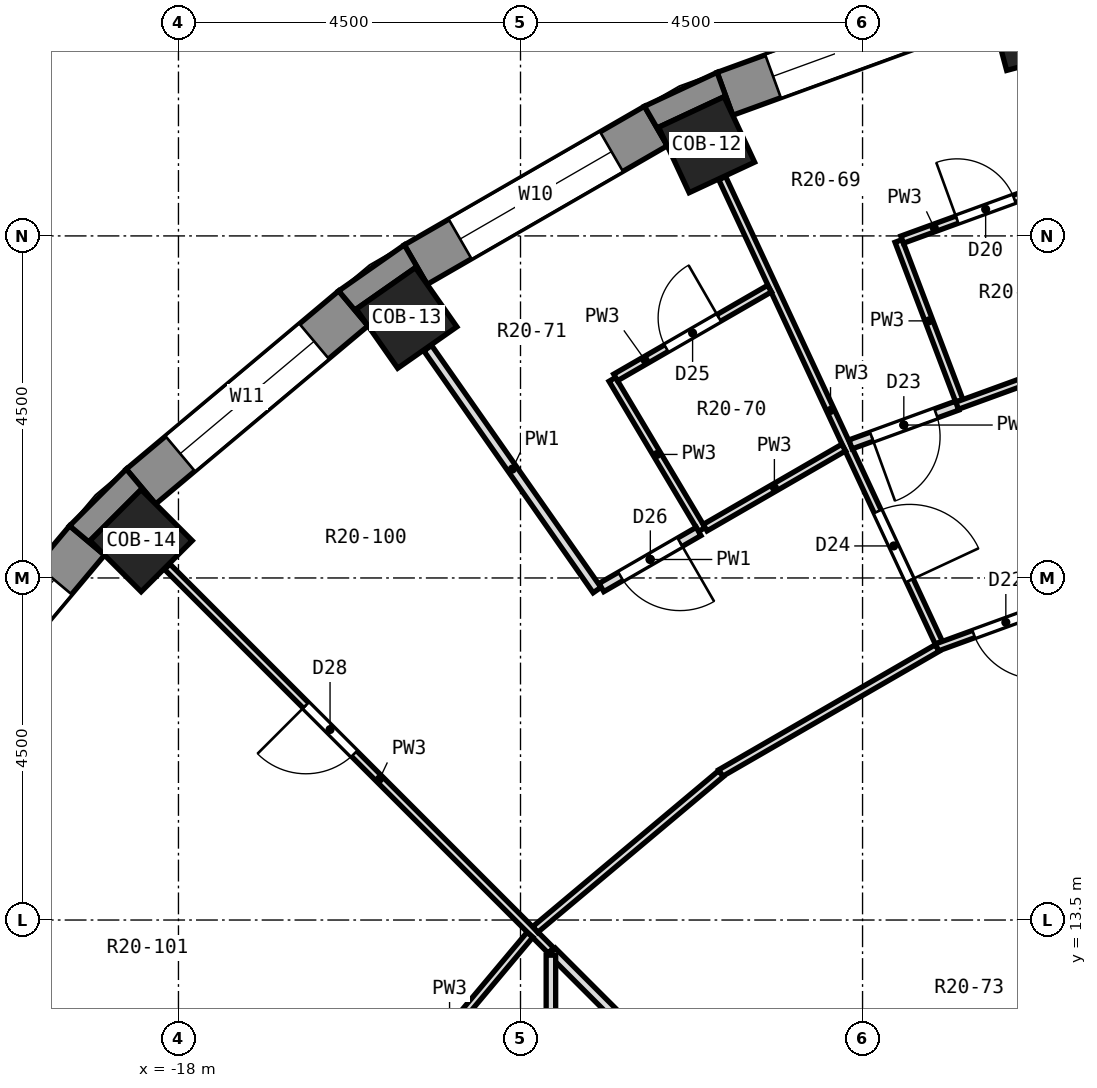
"""IFC4 building model, lengths in metres.
Left out: names, types, materials, properties, quantities, classifications, styles, units other than length and angle.
Written with IfcOpenShell. Run it as: python <this file> out.ifc"""

import sys

from ifc_helpers import new_model, si_unit, direction, frame, frame_2d, origin, origin_2d, place, context, subcontext, project, spatial, polyline, rectangle, outline, extrude, element, fill, save


model = new_model("IFC4")
c1 = context("Model", 3, precision=1e-05, world=origin(), true_north=direction((0.0, 1.0)))
c2 = subcontext(c1, "Body", "Model", "MODEL_VIEW")
j1 = project(units=[si_unit("LENGTHUNIT", "METRE"), si_unit("PLANEANGLEUNIT", "RADIAN")], contexts=[c1])
p1 = place(None, origin())
s1 = spatial("IfcSite", under=j1, at=p1, CompositionType="ELEMENT")
p2 = place(p1, origin())
s2 = spatial("IfcBuilding", under=s1, at=p2, CompositionType="ELEMENT")
p3 = place(p2, frame((0.0, 0.0, 121.6)))
s3 = spatial("IfcBuildingStorey", under=s2, at=p3, CompositionType="ELEMENT", Elevation=121.6)
for number, where, z_axis, x_axis in (
    (1, (-6.768, 25.259, 0.0), (0.0, 0.0, 1.0), (-0.259, 0.966, 0.0)),
    (2, (-11.052, 23.7, 0.0), (0.0, 0.0, 1.0), (-0.423, 0.906, 0.0)),
    (3, (-14.999, 21.421, 0.0), (0.0, 0.0, 1.0), (-0.574, 0.819, 0.0)),
    (4, (-18.491, 18.491, 0.0), (0.0, 0.0, 1.0), (-0.707, 0.707, 0.0)),
):
    element("IfcColumn", number, at=place(p3, frame(where, z_axis=z_axis, x_axis=x_axis)), inside=s3, PredefinedType="COLUMN", context=c2, shape_type="SweptSolid", body=[
        extrude(rectangle(XDim=0.95, YDim=0.95, at=origin_2d()), origin(), (0.0, 0.0, 1.0), 3.3),
    ])
p4 = place(p3, frame((-7.383, 25.617, 0.0), z_axis=(0.0, 0.0, 1.0), x_axis=(-0.939703505393, -0.341990236633, 0.0)))
e5 = element("IfcWall", 5, at=p4, inside=s3, PredefinedType="SOLIDWALL", context=c2, shape_type="SweptSolid", body=[
    extrude(rectangle(XDim=3.648, YDim=0.6, at=frame_2d((1.824, 0.0))), origin(), (0.0, 0.0, 1.0), 2.8),
])
p5 = place(p4, frame((0.674, 0.0, 0.9)))
e6 = element("IfcOpeningElement", 6, at=p5, cuts=e5, PredefinedType="OPENING", context=c2, shape_type="SweptSolid", body=[
    extrude(rectangle(XDim=2.3, YDim=1.8, at=frame_2d((1.15, 0.9))), frame((0.0, 0.312, 0.0), z_axis=(0.0, -1.0, 0.0), x_axis=(1.0, 0.0, 0.0)), (0.0, 0.0, 1.0), 0.624),
])
p6 = place(p3, frame((-11.719, 23.946, 0.0), z_axis=(0.0, 0.0, 1.0), x_axis=(-0.866051847062, -0.499954196102, 0.0)))
e7 = element("IfcWall", 7, at=p6, inside=s3, PredefinedType="SOLIDWALL", context=c2, shape_type="SweptSolid", body=[
    extrude(rectangle(XDim=3.648, YDim=0.6, at=frame_2d((1.824, 0.0))), origin(), (0.0, 0.0, 1.0), 2.8),
])
p7 = place(p6, frame((0.674, 0.0, 0.9)))
e8 = element("IfcOpeningElement", 8, at=p7, cuts=e7, PredefinedType="OPENING", context=c2, shape_type="SweptSolid", body=[
    extrude(rectangle(XDim=2.3, YDim=1.8, at=frame_2d((1.15, 0.9))), frame((0.0, 0.312, 0.0), z_axis=(0.0, -1.0, 0.0), x_axis=(1.0, 0.0, 0.0)), (0.0, 0.0, 1.0), 0.624),
])
p8 = place(p3, frame((-15.699, 21.547, 0.0), z_axis=(0.0, 0.0, 1.0), x_axis=(-0.766055462616, -0.642774476932, 0.0)))
e9 = element("IfcWall", 9, at=p8, inside=s3, PredefinedType="SOLIDWALL", context=c2, shape_type="SweptSolid", body=[
    extrude(rectangle(XDim=3.648, YDim=0.6, at=frame_2d((1.824, 0.0))), origin(), (0.0, 0.0, 1.0), 2.8),
])
p9 = place(p8, frame((0.674, 0.0, 0.9)))
e10 = element("IfcOpeningElement", 10, at=p9, cuts=e9, PredefinedType="OPENING", context=c2, shape_type="SweptSolid", body=[
    extrude(rectangle(XDim=2.3, YDim=1.8, at=frame_2d((1.15, 0.9))), frame((0.0, 0.312, 0.0), z_axis=(0.0, -1.0, 0.0), x_axis=(1.0, 0.0, 0.0)), (0.0, 0.0, 1.0), 0.624),
])
p10 = place(p3, frame((-19.202, 18.494, 0.0), z_axis=(0.0, 0.0, 1.0), x_axis=(-0.642774476932, -0.766055462616, 0.0)))
e11 = element("IfcWall", 11, at=p10, inside=s3, PredefinedType="SOLIDWALL", context=c2, shape_type="SweptSolid", body=[
    extrude(rectangle(XDim=3.648, YDim=0.6, at=frame_2d((1.824, 0.0))), origin(), (0.0, 0.0, 1.0), 2.8),
])
p11 = place(p10, frame((0.674, 0.0, 0.9)))
e12 = element("IfcOpeningElement", 12, at=p11, cuts=e11, PredefinedType="OPENING", context=c2, shape_type="SweptSolid", body=[
    extrude(rectangle(XDim=2.3, YDim=1.8, at=frame_2d((1.15, 0.9))), frame((0.0, 0.312, 0.0), z_axis=(0.0, -1.0, 0.0), x_axis=(1.0, 0.0, 0.0)), (0.0, 0.0, 1.0), 0.624),
])
p12 = place(p3, origin())
e13 = element("IfcWall", 13, at=p12, inside=s3, PredefinedType="SOLIDWALL", context=c2, shape_type="SweptSolid", body=[
    extrude(outline(polyline([(-10.913, 24.651), (-11.869, 24.206), (-11.569, 23.686), (-11.683, 23.93), (-10.822, 24.331), (-10.708, 24.087), (-10.913, 24.651)])), origin(), (0.0, 0.0, 1.0), 2.8),
])
p13 = place(p3, origin())
e14 = element("IfcWall", 14, at=p13, inside=s3, PredefinedType="SOLIDWALL", context=c2, shape_type="SweptSolid", body=[
    extrude(outline(polyline([(-15.892, 21.777), (-15.506, 21.317), (-15.661, 21.538), (-14.882, 22.083), (-14.728, 21.862), (-15.028, 22.382), (-15.892, 21.777)])), origin(), (0.0, 0.0, 1.0), 2.8),
])
p14 = place(p3, origin())
e15 = element("IfcWall", 15, at=p14, inside=s3, PredefinedType="SOLIDWALL", context=c2, shape_type="SweptSolid", body=[
    extrude(outline(polyline([(-18.686, 19.432), (-19.432, 18.686), (-18.972, 18.301), (-19.163, 18.491), (-18.491, 19.163), (-18.301, 18.972), (-18.686, 19.432)])), origin(), (0.0, 0.0, 1.0), 2.8),
])
p15 = place(p3, frame((-8.526, 22.434, 0.0), z_axis=(0.0, 0.0, 1.0), x_axis=(0.355151387301, -0.934808799754, 0.0)))
e16 = element("IfcWall", 16, at=p15, inside=s3, PredefinedType="PARTITIONING", context=c2, shape_type="SweptSolid", body=[
    extrude(rectangle(XDim=2.25, YDim=0.1, at=frame_2d((1.125, 0.0))), origin(), (0.0, 0.0, 1.0), 2.8),
])
p16 = place(p3, frame((-10.846, 23.26, 0.0), z_axis=(0.0, 0.0, 1.0), x_axis=(0.422617898312, -0.906307956506, 0.0)))
e17 = element("IfcWall", 17, at=p16, inside=s3, PredefinedType="PARTITIONING", context=c2, shape_type="SweptSolid", body=[
    extrude(rectangle(XDim=6.744, YDim=0.1, at=frame_2d((3.372, 0.0))), origin(), (0.0, 0.0, 1.0), 2.8),
])
p17 = place(p16, frame((4.839, 0.0, 0.0)))
e18 = element("IfcOpeningElement", 18, at=p17, cuts=e17, PredefinedType="OPENING", context=c2, shape_type="SweptSolid", body=[
    extrude(rectangle(XDim=1.0, YDim=2.1, at=frame_2d((0.5, 1.05))), frame((0.0, 0.062, 0.0), z_axis=(0.0, -1.0, 0.0), x_axis=(1.0, 0.0, 0.0)), (0.0, 0.0, 1.0), 0.124),
])
p18 = place(p3, frame((-12.292, 20.613, 0.0), z_axis=(0.0, 0.0, 1.0), x_axis=(0.512043462342, -0.858959540766, 0.0)))
e19 = element("IfcWall", 19, at=p18, inside=s3, PredefinedType="PARTITIONING", context=c2, shape_type="SweptSolid", body=[
    extrude(rectangle(XDim=2.301, YDim=0.1, at=frame_2d((1.15, 0.0))), origin(), (0.0, 0.0, 1.0), 2.8),
])
p19 = place(p3, frame((-14.721, 21.024, 0.0), z_axis=(0.0, 0.0, 1.0), x_axis=(0.573453908861, -0.819237825306, 0.0)))
e20 = element("IfcWall", 20, at=p19, inside=s3, PredefinedType="PARTITIONING", context=c2, shape_type="SweptSolid", body=[
    extrude(rectangle(XDim=3.885, YDim=0.125, at=frame_2d((1.942, 0.0))), origin(), (0.0, 0.0, 1.0), 2.8),
])
p20 = place(p3, frame((-18.148, 18.148, 0.0), z_axis=(0.0, 0.0, 1.0), x_axis=(0.707106781187, -0.707106781187, 0.0)))
e21 = element("IfcWall", 21, at=p20, inside=s3, PredefinedType="PARTITIONING", context=c2, shape_type="SweptSolid", body=[
    extrude(rectangle(XDim=7.139, YDim=0.1, at=frame_2d((3.569, 0.0))), origin(), (0.0, 0.0, 1.0), 2.8),
])
p21 = place(p20, frame((2.58, 0.0, 0.0)))
e22 = element("IfcOpeningElement", 22, at=p21, cuts=e21, PredefinedType="OPENING", context=c2, shape_type="SweptSolid", body=[
    extrude(rectangle(XDim=0.9, YDim=2.1, at=frame_2d((0.45, 1.05))), frame((0.0, 0.062, 0.0), z_axis=(0.0, -1.0, 0.0), x_axis=(1.0, 0.0, 0.0)), (0.0, 0.0, 1.0), 0.124),
])
p22 = place(p3, frame((-13.086, 13.086, 0.0), z_axis=(0.0, 0.0, 1.0), x_axis=(0.707208486583, -0.707005061159, 0.0)))
e23 = element("IfcWall", 23, at=p22, inside=s3, PredefinedType="PARTITIONING", context=c2, shape_type="SweptSolid", body=[
    extrude(rectangle(XDim=7.201, YDim=0.125, at=frame_2d((3.601, 0.0))), origin(), (0.0, 0.0, 1.0), 2.8),
])
p23 = place(p22, frame((3.126, 0.0, 0.0)))
e24 = element("IfcOpeningElement", 24, at=p23, cuts=e23, PredefinedType="OPENING", context=c2, shape_type="SweptSolid", body=[
    extrude(rectangle(XDim=1.0, YDim=2.1, at=frame_2d((0.5, 1.05))), frame((0.0, 0.074, 0.0), z_axis=(0.0, -1.0, 0.0), x_axis=(1.0, 0.0, 0.0)), (0.0, 0.0, 1.0), 0.149),
])
p24 = place(p3, frame((-8.023, 17.086, 0.0), z_axis=(0.0, 0.0, 1.0), x_axis=(0.93970385633, 0.341989272345, 0.0)))
e25 = element("IfcWall", 25, at=p24, inside=s3, PredefinedType="PARTITIONING", context=c2, shape_type="SweptSolid", body=[
    extrude(rectangle(XDim=1.831, YDim=0.1, at=frame_2d((0.916, 0.0))), origin(), (0.0, 0.0, 1.0), 2.8),
])
p25 = place(p24, frame((0.516, 0.0, 0.0)))
e26 = element("IfcOpeningElement", 26, at=p25, cuts=e25, PredefinedType="OPENING", context=c2, shape_type="SweptSolid", body=[
    extrude(rectangle(XDim=0.9, YDim=2.1, at=frame_2d((0.45, 1.05))), frame((0.0, 0.062, 0.0), z_axis=(0.0, -1.0, 0.0), x_axis=(1.0, 0.0, 0.0)), (0.0, 0.0, 1.0), 0.124),
])
p26 = place(p3, frame((-7.759, 20.265, 0.0), z_axis=(0.0, 0.0, 1.0), x_axis=(0.9397154993, 0.341957278581, 0.0)))
e27 = element("IfcWall", 27, at=p26, inside=s3, PredefinedType="PARTITIONING", context=c2, shape_type="SweptSolid", body=[
    extrude(rectangle(XDim=2.196, YDim=0.1, at=frame_2d((1.098, 0.0))), origin(), (0.0, 0.0, 1.0), 2.8),
])
p27 = place(p3, frame((-9.158, 19.757, 0.0), z_axis=(0.0, 0.0, 1.0), x_axis=(0.939793423488, 0.341743063087, 0.0)))
e28 = element("IfcWall", 28, at=p27, inside=s3, PredefinedType="PARTITIONING", context=c2, shape_type="SweptSolid", body=[
    extrude(rectangle(XDim=1.492, YDim=0.125, at=frame_2d((0.746, 0.0))), origin(), (0.0, 0.0, 1.0), 2.8),
])
p28 = place(p27, frame((0.296, 0.0, 0.0)))
e29 = element("IfcOpeningElement", 29, at=p28, cuts=e28, PredefinedType="OPENING", context=c2, shape_type="SweptSolid", body=[
    extrude(rectangle(XDim=0.9, YDim=2.1, at=frame_2d((0.45, 1.05))), frame((0.0, 0.074, 0.0), z_axis=(0.0, -1.0, 0.0), x_axis=(1.0, 0.0, 0.0)), (0.0, 0.0, 1.0), 0.149),
])
p29 = place(p3, frame((-8.479, 22.451, 0.0), z_axis=(0.0, 0.0, 1.0), x_axis=(0.939671413828, 0.342078403345, 0.0)))
e30 = element("IfcWall", 30, at=p29, inside=s3, PredefinedType="PARTITIONING", context=c2, shape_type="SweptSolid", body=[
    extrude(rectangle(XDim=2.338, YDim=0.1, at=frame_2d((1.169, 0.0))), origin(), (0.0, 0.0, 1.0), 2.8),
])
p30 = place(p29, frame((0.769, 0.0, 0.0)))
e31 = element("IfcOpeningElement", 31, at=p30, cuts=e30, PredefinedType="OPENING", context=c2, shape_type="SweptSolid", body=[
    extrude(rectangle(XDim=0.8, YDim=2.1, at=frame_2d((0.4, 1.05))), frame((0.0, 0.062, 0.0), z_axis=(0.0, -1.0, 0.0), x_axis=(1.0, 0.0, 0.0)), (0.0, 0.0, 1.0), 0.124),
])
p31 = place(p3, frame((-10.868, 15.433, 0.0), z_axis=(0.0, 0.0, 1.0), x_axis=(0.866020017222, 0.500009329683, 0.0)))
e32 = element("IfcWall", 32, at=p31, inside=s3, PredefinedType="PARTITIONING", context=c2, shape_type="SweptSolid", body=[
    extrude(rectangle(XDim=3.291, YDim=0.1, at=frame_2d((1.645, 0.0))), origin(), (0.0, 0.0, 1.0), 2.8),
])
p32 = place(p3, frame((-11.071, 18.662, 0.0), z_axis=(0.0, 0.0, 1.0), x_axis=(0.865870655861, 0.50026793553, 0.0)))
e33 = element("IfcWall", 33, at=p32, inside=s3, PredefinedType="PARTITIONING", context=c2, shape_type="SweptSolid", body=[
    extrude(rectangle(XDim=2.105, YDim=0.1, at=frame_2d((1.052, 0.0))), origin(), (0.0, 0.0, 1.0), 2.8),
])
p33 = place(p3, frame((-12.435, 17.874, 0.0), z_axis=(0.0, 0.0, 1.0), x_axis=(0.866056109487, 0.499946812391, 0.0)))
e34 = element("IfcWall", 34, at=p33, inside=s3, PredefinedType="PARTITIONING", context=c2, shape_type="SweptSolid", body=[
    extrude(rectangle(XDim=1.476, YDim=0.125, at=frame_2d((0.738, 0.0))), origin(), (0.0, 0.0, 1.0), 2.8),
])
p34 = place(p33, frame((0.293, 0.0, 0.0)))
e35 = element("IfcOpeningElement", 35, at=p34, cuts=e34, PredefinedType="OPENING", context=c2, shape_type="SweptSolid", body=[
    extrude(rectangle(XDim=0.9, YDim=2.1, at=frame_2d((0.45, 1.05))), frame((0.0, 0.074, 0.0), z_axis=(0.0, -1.0, 0.0), x_axis=(1.0, 0.0, 0.0)), (0.0, 0.0, 1.0), 0.149),
])
p35 = place(p3, frame((-12.249, 20.638, 0.0), z_axis=(0.0, 0.0, 1.0), x_axis=(0.866076057046, 0.499912255713, 0.0)))
e36 = element("IfcWall", 36, at=p35, inside=s3, PredefinedType="PARTITIONING", context=c2, shape_type="SweptSolid", body=[
    extrude(rectangle(XDim=2.338, YDim=0.1, at=frame_2d((1.169, 0.0))), origin(), (0.0, 0.0, 1.0), 2.8),
])
p36 = place(p35, frame((0.769, 0.0, 0.0)))
e37 = element("IfcOpeningElement", 37, at=p36, cuts=e36, PredefinedType="OPENING", context=c2, shape_type="SweptSolid", body=[
    extrude(rectangle(XDim=0.8, YDim=2.1, at=frame_2d((0.4, 1.05))), frame((0.0, 0.062, 0.0), z_axis=(0.0, -1.0, 0.0), x_axis=(1.0, 0.0, 0.0)), (0.0, 0.0, 1.0), 0.124),
])
p37 = place(p3, frame((-13.306, 13.376, 0.0), z_axis=(0.0, 0.0, 1.0), x_axis=(0.766146553843, 0.642665899232, 0.0)))
e38 = element("IfcWall", 38, at=p37, inside=s3, PredefinedType="PARTITIONING", context=c2, shape_type="SweptSolid", body=[
    extrude(rectangle(XDim=3.189, YDim=0.1, at=frame_2d((1.595, 0.0))), origin(), (0.0, 0.0, 1.0), 2.8),
])
p38 = place(p3, frame((-15.491, 10.785, 0.0), z_axis=(0.0, 0.0, 1.0), x_axis=(0.642706409745, 0.766112570627, 0.0)))
e39 = element("IfcWall", 39, at=p38, inside=s3, PredefinedType="PARTITIONING", context=c2, shape_type="SweptSolid", body=[
    extrude(rectangle(XDim=3.29, YDim=0.1, at=frame_2d((1.645, 0.0))), origin(), (0.0, 0.0, 1.0), 2.8),
])
p39 = place(p3, frame((-13.1, 9.4, 0.0), z_axis=(0.0, 0.0, 1.0), x_axis=(0.0, 1.0, 0.0)))
e40 = element("IfcWall", 40, at=p39, inside=s3, PredefinedType="PARTITIONING", context=c2, shape_type="SweptSolid", body=[
    extrude(rectangle(XDim=3.638, YDim=0.125, at=frame_2d((1.819, 0.0))), origin(), (0.0, 0.0, 1.0), 2.8),
])
p40 = place(p5, origin())
e41 = element("IfcWindow", 41, at=p40, inside=s3, PartitioningType="SINGLE_PANEL", PredefinedType="WINDOW", context=c2, shape_type="SweptSolid", body=[
    extrude(rectangle(XDim=2.3, YDim=1.8, at=frame_2d((1.15, 0.9))), frame((0.0, 0.18, 0.0), z_axis=(0.0, -1.0, 0.0), x_axis=(1.0, 0.0, 0.0)), (0.0, 0.0, 1.0), 0.06),
])
fill(e6, e41)
p41 = place(p7, origin())
e42 = element("IfcWindow", 42, at=p41, inside=s3, PartitioningType="SINGLE_PANEL", PredefinedType="WINDOW", context=c2, shape_type="SweptSolid", body=[
    extrude(rectangle(XDim=2.3, YDim=1.8, at=frame_2d((1.15, 0.9))), frame((0.0, 0.18, 0.0), z_axis=(0.0, -1.0, 0.0), x_axis=(1.0, 0.0, 0.0)), (0.0, 0.0, 1.0), 0.06),
])
fill(e8, e42)
p42 = place(p9, origin())
e43 = element("IfcWindow", 43, at=p42, inside=s3, PartitioningType="SINGLE_PANEL", PredefinedType="WINDOW", context=c2, shape_type="SweptSolid", body=[
    extrude(rectangle(XDim=2.3, YDim=1.8, at=frame_2d((1.15, 0.9))), frame((0.0, 0.18, 0.0), z_axis=(0.0, -1.0, 0.0), x_axis=(1.0, 0.0, 0.0)), (0.0, 0.0, 1.0), 0.06),
])
fill(e10, e43)
p43 = place(p11, origin())
e44 = element("IfcWindow", 44, at=p43, inside=s3, PartitioningType="SINGLE_PANEL", PredefinedType="WINDOW", context=c2, shape_type="SweptSolid", body=[
    extrude(rectangle(XDim=2.3, YDim=1.8, at=frame_2d((1.15, 0.9))), frame((0.0, 0.18, 0.0), z_axis=(0.0, -1.0, 0.0), x_axis=(1.0, 0.0, 0.0)), (0.0, 0.0, 1.0), 0.06),
])
fill(e12, e44)
p44 = place(p30, origin())
e45 = element("IfcDoor", 45, at=p44, inside=s3, OperationType="SINGLE_SWING_LEFT", PredefinedType="DOOR", context=c2, shape_type="SweptSolid", body=[
    extrude(rectangle(XDim=0.8, YDim=2.1, at=frame_2d((0.4, 1.05))), frame((0.0, 0.025, 0.0), z_axis=(0.0, -1.0, 0.0), x_axis=(1.0, 0.0, 0.0)), (0.0, 0.0, 1.0), 0.05),
])
fill(e31, e45)
p45 = place(p25, frame((0.9, 0.0, 0.0), z_axis=(0.0, 0.0, 1.0), x_axis=(-1.0, 0.0, 0.0)))
e46 = element("IfcDoor", 46, at=p45, inside=s3, OperationType="SINGLE_SWING_LEFT", PredefinedType="DOOR", context=c2, shape_type="SweptSolid", body=[
    extrude(rectangle(XDim=0.9, YDim=2.1, at=frame_2d((0.45, 1.05))), frame((0.0, 0.025, 0.0), z_axis=(0.0, -1.0, 0.0), x_axis=(1.0, 0.0, 0.0)), (0.0, 0.0, 1.0), 0.05),
])
fill(e26, e46)
p46 = place(p28, frame((0.9, 0.0, 0.0), z_axis=(0.0, 0.0, 1.0), x_axis=(-1.0, 0.0, 0.0)))
e47 = element("IfcDoor", 47, at=p46, inside=s3, OperationType="SINGLE_SWING_RIGHT", PredefinedType="DOOR", context=c2, shape_type="SweptSolid", body=[
    extrude(rectangle(XDim=0.9, YDim=2.1, at=frame_2d((0.45, 1.05))), frame((0.0, 0.025, 0.0), z_axis=(0.0, -1.0, 0.0), x_axis=(1.0, 0.0, 0.0)), (0.0, 0.0, 1.0), 0.05),
])
fill(e29, e47)
p47 = place(p17, origin())
e48 = element("IfcDoor", 48, at=p47, inside=s3, OperationType="SINGLE_SWING_RIGHT", PredefinedType="DOOR", context=c2, shape_type="SweptSolid", body=[
    extrude(rectangle(XDim=1.0, YDim=2.1, at=frame_2d((0.5, 1.05))), frame((0.0, 0.025, 0.0), z_axis=(0.0, -1.0, 0.0), x_axis=(1.0, 0.0, 0.0)), (0.0, 0.0, 1.0), 0.05),
])
fill(e18, e48)
p48 = place(p36, origin())
e49 = element("IfcDoor", 49, at=p48, inside=s3, OperationType="SINGLE_SWING_RIGHT", PredefinedType="DOOR", context=c2, shape_type="SweptSolid", body=[
    extrude(rectangle(XDim=0.8, YDim=2.1, at=frame_2d((0.4, 1.05))), frame((0.0, 0.025, 0.0), z_axis=(0.0, -1.0, 0.0), x_axis=(1.0, 0.0, 0.0)), (0.0, 0.0, 1.0), 0.05),
])
fill(e37, e49)
p49 = place(p34, frame((0.9, 0.0, 0.0), z_axis=(0.0, 0.0, 1.0), x_axis=(-1.0, 0.0, 0.0)))
e50 = element("IfcDoor", 50, at=p49, inside=s3, OperationType="SINGLE_SWING_LEFT", PredefinedType="DOOR", context=c2, shape_type="SweptSolid", body=[
    extrude(rectangle(XDim=0.9, YDim=2.1, at=frame_2d((0.45, 1.05))), frame((0.0, 0.025, 0.0), z_axis=(0.0, -1.0, 0.0), x_axis=(1.0, 0.0, 0.0)), (0.0, 0.0, 1.0), 0.05),
])
fill(e35, e50)
p50 = place(p21, frame((0.9, 0.0, 0.0), z_axis=(0.0, 0.0, 1.0), x_axis=(-1.0, 0.0, 0.0)))
e51 = element("IfcDoor", 51, at=p50, inside=s3, OperationType="SINGLE_SWING_RIGHT", PredefinedType="DOOR", context=c2, shape_type="SweptSolid", body=[
    extrude(rectangle(XDim=0.9, YDim=2.1, at=frame_2d((0.45, 1.05))), frame((0.0, 0.025, 0.0), z_axis=(0.0, -1.0, 0.0), x_axis=(1.0, 0.0, 0.0)), (0.0, 0.0, 1.0), 0.05),
])
fill(e22, e51)
save(model, sys.argv[1])
